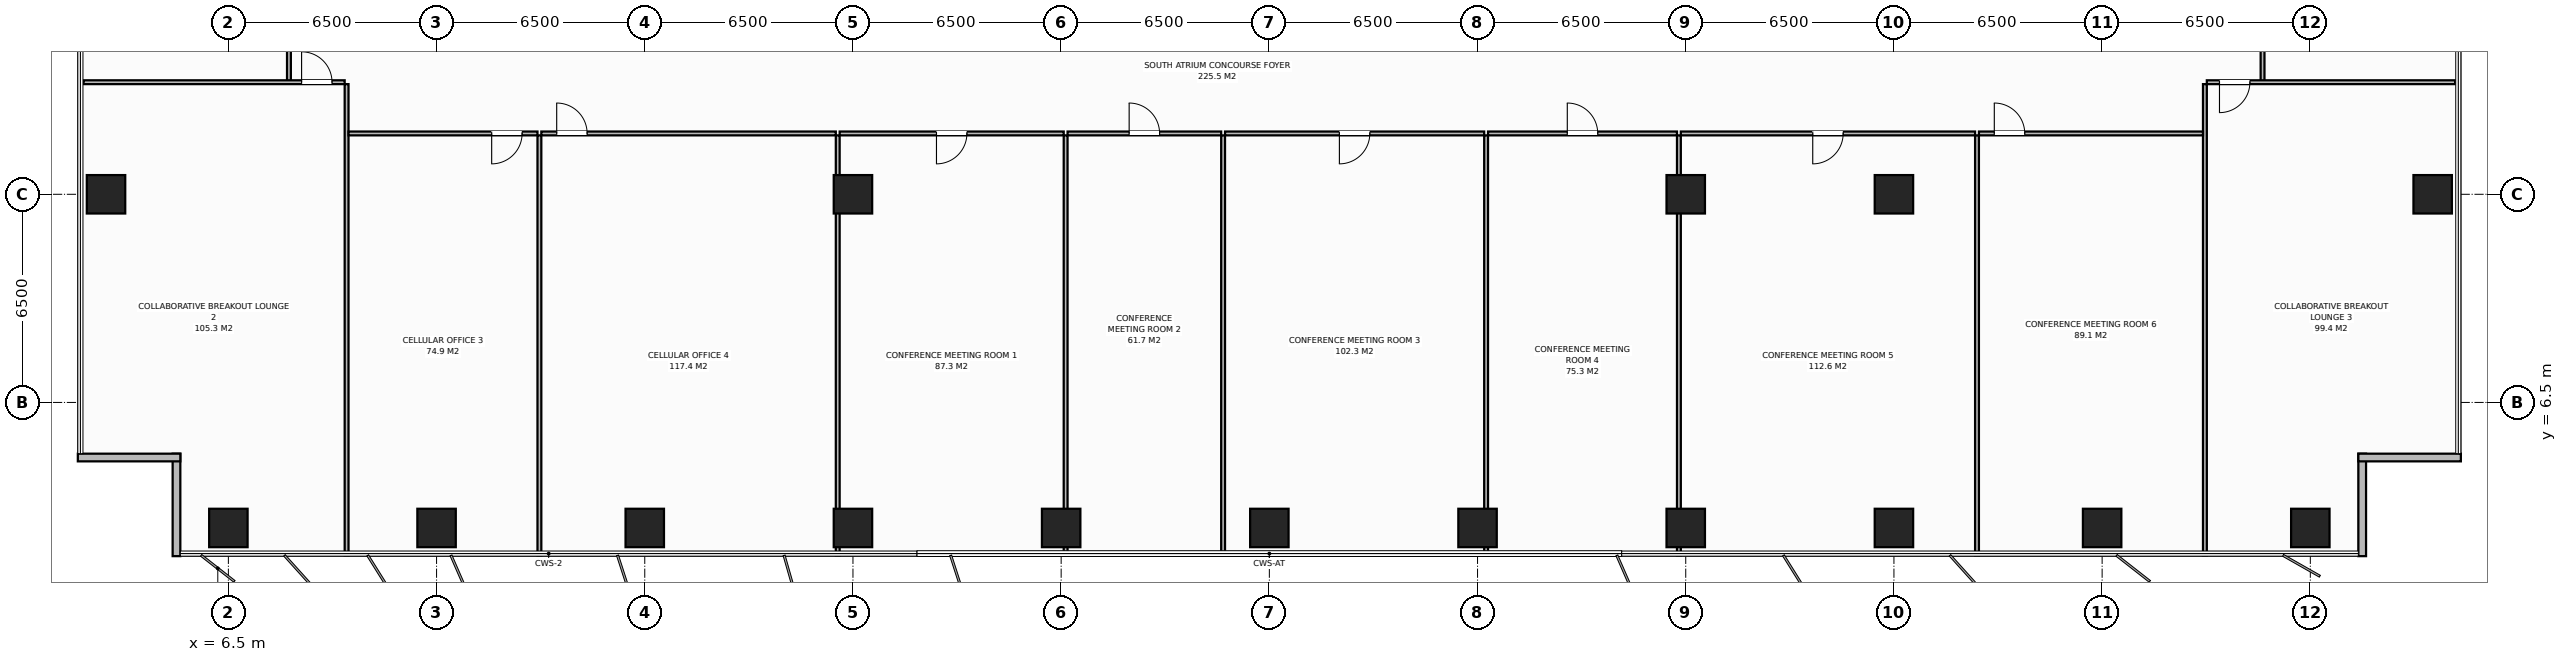
"""IFC4 building model, lengths in metres.
Left out: names, types, materials, properties, quantities, classifications, styles, units other than length and angle.
Written with IfcOpenShell. Run it as: python <this file> out.ifc"""

import sys

from ifc_helpers import new_model, si_unit, direction, frame, frame_2d, origin, origin_2d, place, context, subcontext, project, spatial, rectangle, extrude, element, fill, save


model = new_model("IFC4")
c1 = context("Model", 3, precision=1e-05, world=origin(), true_north=direction((0.0, 1.0)))
c2 = subcontext(c1, "Body", "Model", "MODEL_VIEW")
j1 = project(units=[si_unit("LENGTHUNIT", "METRE"), si_unit("PLANEANGLEUNIT", "RADIAN")], contexts=[c1])
p1 = place(None, origin())
s1 = spatial("IfcSite", under=j1, at=p1, CompositionType="ELEMENT")
p2 = place(p1, origin())
s2 = spatial("IfcBuilding", under=s1, at=p2, CompositionType="ELEMENT")
p3 = place(p2, frame((0.0, 0.0, 127.8)))
s3 = spatial("IfcBuildingStorey", under=s2, at=p3, CompositionType="ELEMENT", Elevation=127.8)
for number, where, z_axis, x_axis in (
    (1, (58.5, 13.0, 0.0), (0.0, 0.0, 1.0), (1.0, 0.0, 0.0)),
    (2, (26.0, 13.0, 0.0), (0.0, 0.0, 1.0), (1.0, 0.0, 0.0)),
    (3, (52.0, 13.0, 0.0), (0.0, 0.0, 1.0), (1.0, 0.0, 0.0)),
    (4, (6.5, 2.58, 0.0), (0.0, 0.0, 1.0), (1.0, 0.0, 0.0)),
    (5, (13.0, 2.58, 0.0), (0.0, 0.0, 1.0), (1.0, 0.0, 0.0)),
    (6, (19.5, 2.58, 0.0), (0.0, 0.0, 1.0), (1.0, 0.0, 0.0)),
    (7, (26.0, 2.58, 0.0), (0.0, 0.0, 1.0), (1.0, 0.0, 0.0)),
    (8, (32.5, 2.58, 0.0), (0.0, 0.0, 1.0), (1.0, 0.0, 0.0)),
    (9, (39.0, 2.58, 0.0), (0.0, 0.0, 1.0), (1.0, 0.0, 0.0)),
    (10, (45.5, 2.58, 0.0), (0.0, 0.0, 1.0), (1.0, 0.0, 0.0)),
    (11, (52.0, 2.58, 0.0), (0.0, 0.0, 1.0), (1.0, 0.0, 0.0)),
    (12, (58.5, 2.58, 0.0), (0.0, 0.0, 1.0), (1.0, 0.0, 0.0)),
    (13, (65.0, 2.58, 0.0), (0.0, 0.0, 1.0), (1.0, 0.0, 0.0)),
    (14, (71.5, 2.58, 0.0), (0.0, 0.0, 1.0), (1.0, 0.0, 0.0)),
    (15, (2.68, 13.0, 0.0), (0.0, 0.0, 1.0), (1.0, 0.0, 0.0)),
    (16, (75.32, 13.0, 0.0), (0.0, 0.0, 1.0), (1.0, 0.0, 0.0)),
):
    element("IfcColumn", number, at=place(p3, frame(where, z_axis=z_axis, x_axis=x_axis)), inside=s3, PredefinedType="COLUMN", context=c2, shape_type="SweptSolid", body=[
        extrude(rectangle(XDim=1.2, YDim=1.2, at=origin_2d()), origin(), (0.0, 0.0, 1.0), 3.8),
    ])
for number, where, z_axis, x_axis in (
    (17, (4.88, 1.7, 0.0), (0.0, 0.0, 1.0), (0.0, 1.0, 0.0)),
    (18, (5.0, 4.78, 0.0), (0.0, 0.0, 1.0), (-1.0, 0.0, 0.0)),
    (19, (73.12, 4.9, 0.0), (0.0, 0.0, 1.0), (0.0, -1.0, 0.0)),
    (20, (76.2, 4.78, 0.0), (0.0, 0.0, 1.0), (-1.0, 0.0, 0.0)),
):
    element("IfcWall", number, at=place(p3, frame(where, z_axis=z_axis, x_axis=x_axis)), inside=s3, PredefinedType="STANDARD", context=c2, shape_type="SweptSolid", body=[
        extrude(rectangle(XDim=3.2, YDim=0.24, at=frame_2d((1.6, 0.0))), origin(), (0.0, 0.0, 1.0), 3.565),
    ])
for number, where, z_axis, x_axis in (
    (21, (8.391, 16.5, 0.0), (0.0, 0.0, 1.0), (0.0, 1.0, 0.0)),
    (22, (70.009, 16.5, 0.0), (0.0, 0.0, 1.0), (0.0, 1.0, 0.0)),
):
    element("IfcWall", number, at=place(p3, frame(where, z_axis=z_axis, x_axis=x_axis)), inside=s3, PredefinedType="PARTITIONING", context=c2, shape_type="SweptSolid", body=[
        extrude(rectangle(XDim=2.1, YDim=0.12, at=frame_2d((1.05, 0.0))), origin(), (0.0, 0.0, 1.0), 3.565),
    ])
p4 = place(p3, frame((10.191, 1.72, 0.0), z_axis=(0.0, 0.0, 1.0), x_axis=(0.0, 1.0, 0.0)))
e23 = element("IfcWall", 23, at=p4, inside=s3, PredefinedType="PARTITIONING", context=c2, shape_type="SweptSolid", body=[
    extrude(rectangle(XDim=14.72, YDim=0.12, at=frame_2d((7.36, 0.0))), origin(), (0.0, 0.0, 1.0), 3.565),
])
p5 = place(p3, frame((1.98, 16.5, 0.0), z_axis=(0.0, 0.0, 1.0), x_axis=(1.0, 0.0, 0.0)))
e24 = element("IfcWall", 24, at=p5, inside=s3, PredefinedType="PARTITIONING", context=c2, shape_type="SweptSolid", body=[
    extrude(rectangle(XDim=8.151, YDim=0.12, at=frame_2d((4.076, 0.0))), origin(), (0.0, 0.0, 1.0), 3.565),
])
p6 = place(p5, frame((6.806, 0.0, 0.0)))
e25 = element("IfcOpeningElement", 25, at=p6, cuts=e24, PredefinedType="OPENING", context=c2, shape_type="SweptSolid", body=[
    extrude(rectangle(XDim=0.95, YDim=2.15, at=frame_2d((0.475, 1.075))), frame((0.0, 0.07, 0.0), z_axis=(0.0, -1.0, 0.0), x_axis=(1.0, 0.0, 0.0)), (0.0, 0.0, 1.0), 0.14),
])
p7 = place(p3, frame((16.21, 1.72, 0.0), z_axis=(0.0, 0.0, 1.0), x_axis=(0.0, 1.0, 0.0)))
e26 = element("IfcWall", 26, at=p7, inside=s3, PredefinedType="PARTITIONING", context=c2, shape_type="SweptSolid", body=[
    extrude(rectangle(XDim=13.12, YDim=0.12, at=frame_2d((6.56, 0.0))), origin(), (0.0, 0.0, 1.0), 3.565),
])
p8 = place(p3, frame((10.251, 14.9, 0.0), z_axis=(0.0, 0.0, 1.0), x_axis=(1.0, 0.0, 0.0)))
e27 = element("IfcWall", 27, at=p8, inside=s3, PredefinedType="PARTITIONING", context=c2, shape_type="SweptSolid", body=[
    extrude(rectangle(XDim=5.899, YDim=0.12, at=frame_2d((2.95, 0.0))), origin(), (0.0, 0.0, 1.0), 3.565),
])
p9 = place(p8, frame((4.469, 0.0, 0.0)))
e28 = element("IfcOpeningElement", 28, at=p9, cuts=e27, PredefinedType="OPENING", context=c2, shape_type="SweptSolid", body=[
    extrude(rectangle(XDim=0.95, YDim=2.15, at=frame_2d((0.475, 1.075))), frame((0.0, 0.07, 0.0), z_axis=(0.0, -1.0, 0.0), x_axis=(1.0, 0.0, 0.0)), (0.0, 0.0, 1.0), 0.14),
])
p10 = place(p3, frame((25.525, 1.72, 0.0), z_axis=(0.0, 0.0, 1.0), x_axis=(0.0, 1.0, 0.0)))
e29 = element("IfcWall", 29, at=p10, inside=s3, PredefinedType="PARTITIONING", context=c2, shape_type="SweptSolid", body=[
    extrude(rectangle(XDim=13.12, YDim=0.12, at=frame_2d((6.56, 0.0))), origin(), (0.0, 0.0, 1.0), 3.565),
])
p11 = place(p3, frame((16.271, 14.9, 0.0), z_axis=(0.0, 0.0, 1.0), x_axis=(1.0, 0.0, 0.0)))
e30 = element("IfcWall", 30, at=p11, inside=s3, PredefinedType="PARTITIONING", context=c2, shape_type="SweptSolid", body=[
    extrude(rectangle(XDim=9.194, YDim=0.12, at=frame_2d((4.597, 0.0))), origin(), (0.0, 0.0, 1.0), 3.565),
])
p12 = place(p11, frame((0.48, 0.0, 0.0)))
e31 = element("IfcOpeningElement", 31, at=p12, cuts=e30, PredefinedType="OPENING", context=c2, shape_type="SweptSolid", body=[
    extrude(rectangle(XDim=0.95, YDim=2.15, at=frame_2d((0.475, 1.075))), frame((0.0, 0.07, 0.0), z_axis=(0.0, -1.0, 0.0), x_axis=(1.0, 0.0, 0.0)), (0.0, 0.0, 1.0), 0.14),
])
p13 = place(p3, frame((32.64, 1.72, 0.0), z_axis=(0.0, 0.0, 1.0), x_axis=(0.0, 1.0, 0.0)))
e32 = element("IfcWall", 32, at=p13, inside=s3, PredefinedType="PARTITIONING", context=c2, shape_type="SweptSolid", body=[
    extrude(rectangle(XDim=13.12, YDim=0.12, at=frame_2d((6.56, 0.0))), origin(), (0.0, 0.0, 1.0), 2.965),
])
p14 = place(p3, frame((25.585, 14.9, 0.0), z_axis=(0.0, 0.0, 1.0), x_axis=(1.0, 0.0, 0.0)))
e33 = element("IfcWall", 33, at=p14, inside=s3, PredefinedType="PARTITIONING", context=c2, shape_type="SweptSolid", body=[
    extrude(rectangle(XDim=6.995, YDim=0.12, at=frame_2d((3.498, 0.0))), origin(), (0.0, 0.0, 1.0), 3.565),
])
p15 = place(p14, frame((3.023, 0.0, 0.0)))
e34 = element("IfcOpeningElement", 34, at=p15, cuts=e33, PredefinedType="OPENING", context=c2, shape_type="SweptSolid", body=[
    extrude(rectangle(XDim=0.95, YDim=2.15, at=frame_2d((0.475, 1.075))), frame((0.0, 0.07, 0.0), z_axis=(0.0, -1.0, 0.0), x_axis=(1.0, 0.0, 0.0)), (0.0, 0.0, 1.0), 0.14),
])
p16 = place(p3, frame((37.556, 1.72, 0.0), z_axis=(0.0, 0.0, 1.0), x_axis=(0.0, 1.0, 0.0)))
e35 = element("IfcWall", 35, at=p16, inside=s3, PredefinedType="PARTITIONING", context=c2, shape_type="SweptSolid", body=[
    extrude(rectangle(XDim=13.12, YDim=0.12, at=frame_2d((6.56, 0.0))), origin(), (0.0, 0.0, 1.0), 3.565),
])
p17 = place(p3, frame((32.7, 14.9, 0.0), z_axis=(0.0, 0.0, 1.0), x_axis=(1.0, 0.0, 0.0)))
e36 = element("IfcWall", 36, at=p17, inside=s3, PredefinedType="PARTITIONING", context=c2, shape_type="SweptSolid", body=[
    extrude(rectangle(XDim=4.796, YDim=0.12, at=frame_2d((2.398, 0.0))), origin(), (0.0, 0.0, 1.0), 3.565),
])
p18 = place(p17, frame((1.923, 0.0, 0.0)))
e37 = element("IfcOpeningElement", 37, at=p18, cuts=e36, PredefinedType="OPENING", context=c2, shape_type="SweptSolid", body=[
    extrude(rectangle(XDim=0.95, YDim=2.15, at=frame_2d((0.475, 1.075))), frame((0.0, 0.07, 0.0), z_axis=(0.0, -1.0, 0.0), x_axis=(1.0, 0.0, 0.0)), (0.0, 0.0, 1.0), 0.14),
])
p19 = place(p3, frame((45.767, 1.72, 0.0), z_axis=(0.0, 0.0, 1.0), x_axis=(0.0, 1.0, 0.0)))
e38 = element("IfcWall", 38, at=p19, inside=s3, PredefinedType="PARTITIONING", context=c2, shape_type="SweptSolid", body=[
    extrude(rectangle(XDim=13.12, YDim=0.12, at=frame_2d((6.56, 0.0))), origin(), (0.0, 0.0, 1.0), 3.565),
])
p20 = place(p3, frame((37.616, 14.9, 0.0), z_axis=(0.0, 0.0, 1.0), x_axis=(1.0, 0.0, 0.0)))
e39 = element("IfcWall", 39, at=p20, inside=s3, PredefinedType="PARTITIONING", context=c2, shape_type="SweptSolid", body=[
    extrude(rectangle(XDim=8.091, YDim=0.12, at=frame_2d((4.045, 0.0))), origin(), (0.0, 0.0, 1.0), 3.565),
])
p21 = place(p20, frame((3.571, 0.0, 0.0)))
e40 = element("IfcOpeningElement", 40, at=p21, cuts=e39, PredefinedType="OPENING", context=c2, shape_type="SweptSolid", body=[
    extrude(rectangle(XDim=0.95, YDim=2.15, at=frame_2d((0.475, 1.075))), frame((0.0, 0.07, 0.0), z_axis=(0.0, -1.0, 0.0), x_axis=(1.0, 0.0, 0.0)), (0.0, 0.0, 1.0), 0.14),
])
p22 = place(p3, frame((51.787, 1.72, 0.0), z_axis=(0.0, 0.0, 1.0), x_axis=(0.0, 1.0, 0.0)))
e41 = element("IfcWall", 41, at=p22, inside=s3, PredefinedType="PARTITIONING", context=c2, shape_type="SweptSolid", body=[
    extrude(rectangle(XDim=13.12, YDim=0.12, at=frame_2d((6.56, 0.0))), origin(), (0.0, 0.0, 1.0), 2.965),
])
p23 = place(p3, frame((45.827, 14.9, 0.0), z_axis=(0.0, 0.0, 1.0), x_axis=(1.0, 0.0, 0.0)))
e42 = element("IfcWall", 42, at=p23, inside=s3, PredefinedType="PARTITIONING", context=c2, shape_type="SweptSolid", body=[
    extrude(rectangle(XDim=5.899, YDim=0.12, at=frame_2d((2.95, 0.0))), origin(), (0.0, 0.0, 1.0), 3.565),
])
p24 = place(p23, frame((2.475, 0.0, 0.0)))
e43 = element("IfcOpeningElement", 43, at=p24, cuts=e42, PredefinedType="OPENING", context=c2, shape_type="SweptSolid", body=[
    extrude(rectangle(XDim=0.95, YDim=2.15, at=frame_2d((0.475, 1.075))), frame((0.0, 0.07, 0.0), z_axis=(0.0, -1.0, 0.0), x_axis=(1.0, 0.0, 0.0)), (0.0, 0.0, 1.0), 0.14),
])
p25 = place(p3, frame((61.094, 1.72, 0.0), z_axis=(0.0, 0.0, 1.0), x_axis=(0.0, 1.0, 0.0)))
e44 = element("IfcWall", 44, at=p25, inside=s3, PredefinedType="PARTITIONING", context=c2, shape_type="SweptSolid", body=[
    extrude(rectangle(XDim=13.12, YDim=0.12, at=frame_2d((6.56, 0.0))), origin(), (0.0, 0.0, 1.0), 3.565),
])
p26 = place(p3, frame((51.847, 14.9, 0.0), z_axis=(0.0, 0.0, 1.0), x_axis=(1.0, 0.0, 0.0)))
e45 = element("IfcWall", 45, at=p26, inside=s3, PredefinedType="PARTITIONING", context=c2, shape_type="SweptSolid", body=[
    extrude(rectangle(XDim=9.187, YDim=0.12, at=frame_2d((4.593, 0.0))), origin(), (0.0, 0.0, 1.0), 3.565),
])
p27 = place(p26, frame((4.118, 0.0, 0.0)))
e46 = element("IfcOpeningElement", 46, at=p27, cuts=e45, PredefinedType="OPENING", context=c2, shape_type="SweptSolid", body=[
    extrude(rectangle(XDim=0.95, YDim=2.15, at=frame_2d((0.475, 1.075))), frame((0.0, 0.07, 0.0), z_axis=(0.0, -1.0, 0.0), x_axis=(1.0, 0.0, 0.0)), (0.0, 0.0, 1.0), 0.14),
])
p28 = place(p3, frame((68.209, 1.72, 0.0), z_axis=(0.0, 0.0, 1.0), x_axis=(0.0, 1.0, 0.0)))
e47 = element("IfcWall", 47, at=p28, inside=s3, PredefinedType="PARTITIONING", context=c2, shape_type="SweptSolid", body=[
    extrude(rectangle(XDim=14.72, YDim=0.12, at=frame_2d((7.36, 0.0))), origin(), (0.0, 0.0, 1.0), 3.565),
])
p29 = place(p3, frame((61.154, 14.9, 0.0), z_axis=(0.0, 0.0, 1.0), x_axis=(1.0, 0.0, 0.0)))
e48 = element("IfcWall", 48, at=p29, inside=s3, PredefinedType="PARTITIONING", context=c2, shape_type="SweptSolid", body=[
    extrude(rectangle(XDim=6.995, YDim=0.12, at=frame_2d((3.498, 0.0))), origin(), (0.0, 0.0, 1.0), 3.565),
])
p30 = place(p29, frame((0.48, 0.0, 0.0)))
e49 = element("IfcOpeningElement", 49, at=p30, cuts=e48, PredefinedType="OPENING", context=c2, shape_type="SweptSolid", body=[
    extrude(rectangle(XDim=0.95, YDim=2.15, at=frame_2d((0.475, 1.075))), frame((0.0, 0.07, 0.0), z_axis=(0.0, -1.0, 0.0), x_axis=(1.0, 0.0, 0.0)), (0.0, 0.0, 1.0), 0.14),
])
p31 = place(p3, frame((68.269, 16.5, 0.0), z_axis=(0.0, 0.0, 1.0), x_axis=(1.0, 0.0, 0.0)))
e50 = element("IfcWall", 50, at=p31, inside=s3, PredefinedType="PARTITIONING", context=c2, shape_type="SweptSolid", body=[
    extrude(rectangle(XDim=7.751, YDim=0.12, at=frame_2d((3.875, 0.0))), origin(), (0.0, 0.0, 1.0), 3.565),
])
p32 = place(p31, frame((0.395, 0.0, 0.0)))
e51 = element("IfcOpeningElement", 51, at=p32, cuts=e50, PredefinedType="OPENING", context=c2, shape_type="SweptSolid", body=[
    extrude(rectangle(XDim=0.95, YDim=2.15, at=frame_2d((0.475, 1.075))), frame((0.0, 0.07, 0.0), z_axis=(0.0, -1.0, 0.0), x_axis=(1.0, 0.0, 0.0)), (0.0, 0.0, 1.0), 0.14),
])
p33 = place(p6, origin())
e52 = element("IfcDoor", 52, at=p33, inside=s3, OperationType="SINGLE_SWING_LEFT", PredefinedType="DOOR", context=c2, shape_type="SweptSolid", body=[
    extrude(rectangle(XDim=0.95, YDim=2.15, at=frame_2d((0.475, 1.075))), frame((0.0, 0.025, 0.0), z_axis=(0.0, -1.0, 0.0), x_axis=(1.0, 0.0, 0.0)), (0.0, 0.0, 1.0), 0.05),
])
fill(e25, e52)
p34 = place(p9, origin())
e53 = element("IfcDoor", 53, at=p34, inside=s3, OperationType="SINGLE_SWING_RIGHT", PredefinedType="DOOR", context=c2, shape_type="SweptSolid", body=[
    extrude(rectangle(XDim=0.95, YDim=2.15, at=frame_2d((0.475, 1.075))), frame((0.0, 0.025, 0.0), z_axis=(0.0, -1.0, 0.0), x_axis=(1.0, 0.0, 0.0)), (0.0, 0.0, 1.0), 0.05),
])
fill(e28, e53)
p35 = place(p12, origin())
e54 = element("IfcDoor", 54, at=p35, inside=s3, OperationType="SINGLE_SWING_LEFT", PredefinedType="DOOR", context=c2, shape_type="SweptSolid", body=[
    extrude(rectangle(XDim=0.95, YDim=2.15, at=frame_2d((0.475, 1.075))), frame((0.0, 0.025, 0.0), z_axis=(0.0, -1.0, 0.0), x_axis=(1.0, 0.0, 0.0)), (0.0, 0.0, 1.0), 0.05),
])
fill(e31, e54)
p36 = place(p15, origin())
e55 = element("IfcDoor", 55, at=p36, inside=s3, OperationType="SINGLE_SWING_RIGHT", PredefinedType="DOOR", context=c2, shape_type="SweptSolid", body=[
    extrude(rectangle(XDim=0.95, YDim=2.15, at=frame_2d((0.475, 1.075))), frame((0.0, 0.025, 0.0), z_axis=(0.0, -1.0, 0.0), x_axis=(1.0, 0.0, 0.0)), (0.0, 0.0, 1.0), 0.05),
])
fill(e34, e55)
p37 = place(p18, origin())
e56 = element("IfcDoor", 56, at=p37, inside=s3, OperationType="SINGLE_SWING_LEFT", PredefinedType="DOOR", context=c2, shape_type="SweptSolid", body=[
    extrude(rectangle(XDim=0.95, YDim=2.15, at=frame_2d((0.475, 1.075))), frame((0.0, 0.025, 0.0), z_axis=(0.0, -1.0, 0.0), x_axis=(1.0, 0.0, 0.0)), (0.0, 0.0, 1.0), 0.05),
])
fill(e37, e56)
p38 = place(p21, origin())
e57 = element("IfcDoor", 57, at=p38, inside=s3, OperationType="SINGLE_SWING_RIGHT", PredefinedType="DOOR", context=c2, shape_type="SweptSolid", body=[
    extrude(rectangle(XDim=0.95, YDim=2.15, at=frame_2d((0.475, 1.075))), frame((0.0, 0.025, 0.0), z_axis=(0.0, -1.0, 0.0), x_axis=(1.0, 0.0, 0.0)), (0.0, 0.0, 1.0), 0.05),
])
fill(e40, e57)
p39 = place(p24, origin())
e58 = element("IfcDoor", 58, at=p39, inside=s3, OperationType="SINGLE_SWING_LEFT", PredefinedType="DOOR", context=c2, shape_type="SweptSolid", body=[
    extrude(rectangle(XDim=0.95, YDim=2.15, at=frame_2d((0.475, 1.075))), frame((0.0, 0.025, 0.0), z_axis=(0.0, -1.0, 0.0), x_axis=(1.0, 0.0, 0.0)), (0.0, 0.0, 1.0), 0.05),
])
fill(e43, e58)
p40 = place(p27, origin())
e59 = element("IfcDoor", 59, at=p40, inside=s3, OperationType="SINGLE_SWING_RIGHT", PredefinedType="DOOR", context=c2, shape_type="SweptSolid", body=[
    extrude(rectangle(XDim=0.95, YDim=2.15, at=frame_2d((0.475, 1.075))), frame((0.0, 0.025, 0.0), z_axis=(0.0, -1.0, 0.0), x_axis=(1.0, 0.0, 0.0)), (0.0, 0.0, 1.0), 0.05),
])
fill(e46, e59)
p41 = place(p30, origin())
e60 = element("IfcDoor", 60, at=p41, inside=s3, OperationType="SINGLE_SWING_LEFT", PredefinedType="DOOR", context=c2, shape_type="SweptSolid", body=[
    extrude(rectangle(XDim=0.95, YDim=2.15, at=frame_2d((0.475, 1.075))), frame((0.0, 0.025, 0.0), z_axis=(0.0, -1.0, 0.0), x_axis=(1.0, 0.0, 0.0)), (0.0, 0.0, 1.0), 0.05),
])
fill(e49, e60)
p42 = place(p32, origin())
e61 = element("IfcDoor", 61, at=p42, inside=s3, OperationType="SINGLE_SWING_RIGHT", PredefinedType="DOOR", context=c2, shape_type="SweptSolid", body=[
    extrude(rectangle(XDim=0.95, YDim=2.15, at=frame_2d((0.475, 1.075))), frame((0.0, 0.025, 0.0), z_axis=(0.0, -1.0, 0.0), x_axis=(1.0, 0.0, 0.0)), (0.0, 0.0, 1.0), 0.05),
])
fill(e51, e61)
save(model, sys.argv[1])
